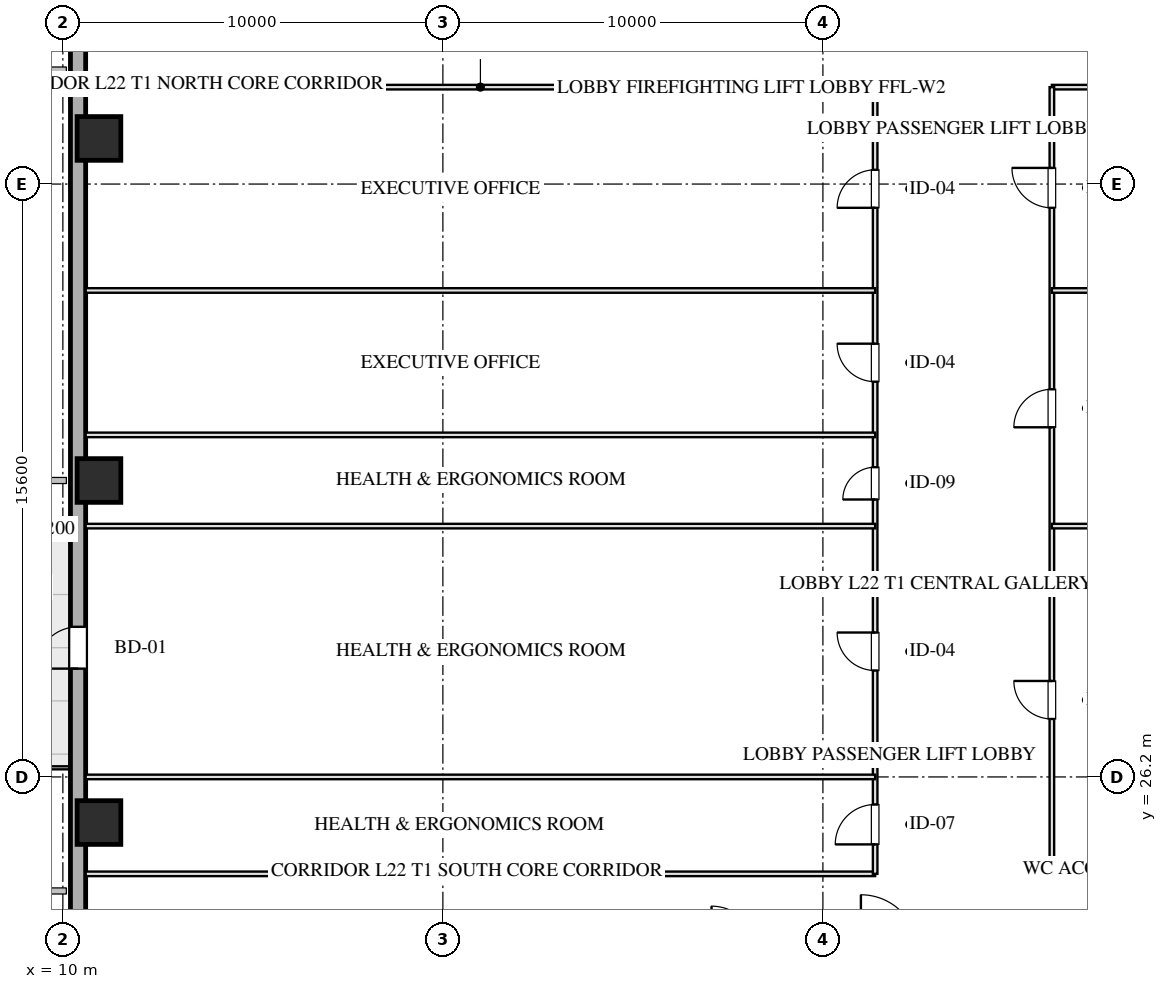
"""IFC4 building model, lengths in metres.
Left out: names, types, materials, properties, quantities, classifications, styles, units other than length and angle.
Written with IfcOpenShell. Run it as: python <this file> out.ifc"""

import sys

from ifc_helpers import new_model, si_unit, direction, frame, frame_2d, origin, origin_2d, place, context, subcontext, project, spatial, rectangle, hollow_rectangle, extrude, element, fill, save


model = new_model("IFC4")
c1 = context("Model", 3, precision=1e-05, world=origin(), true_north=direction((0.0, 1.0)))
c2 = subcontext(c1, "Body", "Model", "MODEL_VIEW")
j1 = project(units=[si_unit("LENGTHUNIT", "METRE"), si_unit("PLANEANGLEUNIT", "RADIAN")], contexts=[c1])
p1 = place(None, origin())
s1 = spatial("IfcSite", under=j1, at=p1, CompositionType="ELEMENT")
p2 = place(p1, origin())
s2 = spatial("IfcBuilding", under=s1, at=p2, CompositionType="ELEMENT")
p3 = place(p2, frame((0.0, 0.0, 88.55)))
s3 = spatial("IfcBuildingStorey", under=s2, at=p3, CompositionType="ELEMENT", Elevation=88.55)
for number, where, z_axis, x_axis in (
    (1, (10.95, 25.0, 0.0), (0.0, 0.0, 1.0), (1.0, 0.0, 0.0)),
    (2, (10.95, 34.0, 0.0), (0.0, 0.0, 1.0), (1.0, 0.0, 0.0)),
    (3, (10.95, 43.0, 0.0), (0.0, 0.0, 1.0), (1.0, 0.0, 0.0)),
):
    element("IfcColumn", number, at=place(p3, frame(where, z_axis=z_axis, x_axis=x_axis)), inside=s3, PredefinedType="COLUMN", context=c2, shape_type="SweptSolid", body=[
        extrude(hollow_rectangle(XDim=1.15, YDim=1.15, WallThickness=0.04, at=origin_2d()), origin(), (0.0, 0.0, 1.0), 3.451),
    ])
p4 = place(p3, frame((10.4, 7.2, 0.0), z_axis=(0.0, 0.0, 1.0), x_axis=(0.0, 1.0, 0.0)))
e4 = element("IfcWall", 4, at=p4, inside=s3, PredefinedType="SOLIDWALL", context=c2, shape_type="SweptSolid", body=[
    extrude(rectangle(XDim=53.6, YDim=0.4, at=frame_2d((26.8, 0.0))), origin(), (0.0, 0.0, 1.0), 2.55),
])
p5 = place(p4, frame((21.85, 0.0, 0.0)))
e5 = element("IfcOpeningElement", 5, at=p5, cuts=e4, PredefinedType="OPENING", context=c2, shape_type="SweptSolid", body=[
    extrude(rectangle(XDim=1.1, YDim=2.15, at=frame_2d((0.55, 1.075))), frame((0.0, 0.21, 0.0), z_axis=(0.0, -1.0, 0.0), x_axis=(1.0, 0.0, 0.0)), (0.0, 0.0, 1.0), 0.42),
])
p6 = place(p3, frame((10.6, 23.65, 0.0), z_axis=(0.0, 0.0, 1.0), x_axis=(1.0, 0.0, 0.0)))
e6 = element("IfcWall", 6, at=p6, inside=s3, PredefinedType="PARTITIONING", context=c2, shape_type="SweptSolid", body=[
    extrude(rectangle(XDim=20.775, YDim=0.12, at=frame_2d((10.387, 0.0))), origin(), (0.0, 0.0, 1.0), 2.15),
])
p7 = place(p3, frame((36.025, 23.65, 0.0), z_axis=(0.0, 0.0, 1.0), x_axis=(1.0, 0.0, 0.0)))
e7 = element("IfcWall", 7, at=p7, inside=s3, PredefinedType="PARTITIONING", context=c2, shape_type="SweptSolid", body=[
    extrude(rectangle(XDim=13.375, YDim=0.12, at=frame_2d((6.688, 0.0))), origin(), (0.0, 0.0, 1.0), 2.15),
])
p8 = place(p3, frame((10.6, 44.35, 0.0), z_axis=(0.0, 0.0, 1.0), x_axis=(1.0, 0.0, 0.0)))
e8 = element("IfcWall", 8, at=p8, inside=s3, PredefinedType="PARTITIONING", context=c2, shape_type="SweptSolid", body=[
    extrude(rectangle(XDim=20.775, YDim=0.12, at=frame_2d((10.387, 0.0))), origin(), (0.0, 0.0, 1.0), 2.15),
])
p9 = place(p3, frame((36.025, 44.35, 0.0), z_axis=(0.0, 0.0, 1.0), x_axis=(1.0, 0.0, 0.0)))
e9 = element("IfcWall", 9, at=p9, inside=s3, PredefinedType="PARTITIONING", context=c2, shape_type="SweptSolid", body=[
    extrude(rectangle(XDim=13.375, YDim=0.12, at=frame_2d((6.688, 0.0))), origin(), (0.0, 0.0, 1.0), 2.15),
])
p10 = place(p3, frame((31.375, 23.65, 0.0), z_axis=(0.0, 0.0, 1.0), x_axis=(0.0, 1.0, 0.0)))
e10 = element("IfcWall", 10, at=p10, inside=s3, PredefinedType="PARTITIONING", context=c2, shape_type="SweptSolid", body=[
    extrude(rectangle(XDim=20.7, YDim=0.12, at=frame_2d((10.35, 0.0))), origin(), (0.0, 0.0, 1.0), 3.155),
])
p11 = place(p10, frame((0.775, 0.0, 0.0)))
e11 = element("IfcOpeningElement", 11, at=p11, cuts=e10, PredefinedType="OPENING", context=c2, shape_type="SweptSolid", body=[
    extrude(rectangle(XDim=1.05, YDim=2.05, at=frame_2d((0.525, 1.025))), frame((0.0, 0.07, 0.0), z_axis=(0.0, -1.0, 0.0), x_axis=(1.0, 0.0, 0.0)), (0.0, 0.0, 1.0), 0.14),
])
p12 = place(p10, frame((5.35, 0.0, 0.0)))
e12 = element("IfcOpeningElement", 12, at=p12, cuts=e10, PredefinedType="OPENING", context=c2, shape_type="SweptSolid", body=[
    extrude(rectangle(XDim=1.0, YDim=2.05, at=frame_2d((0.5, 1.025))), frame((0.0, 0.07, 0.0), z_axis=(0.0, -1.0, 0.0), x_axis=(1.0, 0.0, 0.0)), (0.0, 0.0, 1.0), 0.14),
])
p13 = place(p10, frame((9.85, 0.0, 0.0)))
e13 = element("IfcOpeningElement", 13, at=p13, cuts=e10, PredefinedType="OPENING", context=c2, shape_type="SweptSolid", body=[
    extrude(rectangle(XDim=0.85, YDim=2.05, at=frame_2d((0.425, 1.025))), frame((0.0, 0.07, 0.0), z_axis=(0.0, -1.0, 0.0), x_axis=(1.0, 0.0, 0.0)), (0.0, 0.0, 1.0), 0.14),
])
p14 = place(p10, frame((12.95, 0.0, 0.0)))
e14 = element("IfcOpeningElement", 14, at=p14, cuts=e10, PredefinedType="OPENING", context=c2, shape_type="SweptSolid", body=[
    extrude(rectangle(XDim=1.0, YDim=2.05, at=frame_2d((0.5, 1.025))), frame((0.0, 0.07, 0.0), z_axis=(0.0, -1.0, 0.0), x_axis=(1.0, 0.0, 0.0)), (0.0, 0.0, 1.0), 0.14),
])
p15 = place(p10, frame((17.525, 0.0, 0.0)))
e15 = element("IfcOpeningElement", 15, at=p15, cuts=e10, PredefinedType="OPENING", context=c2, shape_type="SweptSolid", body=[
    extrude(rectangle(XDim=1.0, YDim=2.05, at=frame_2d((0.5, 1.025))), frame((0.0, 0.07, 0.0), z_axis=(0.0, -1.0, 0.0), x_axis=(1.0, 0.0, 0.0)), (0.0, 0.0, 1.0), 0.14),
])
p16 = place(p3, frame((36.025, 23.65, 0.0), z_axis=(0.0, 0.0, 1.0), x_axis=(0.0, 1.0, 0.0)))
e16 = element("IfcWall", 16, at=p16, inside=s3, PredefinedType="PARTITIONING", context=c2, shape_type="SweptSolid", body=[
    extrude(rectangle(XDim=20.7, YDim=0.12, at=frame_2d((10.35, 0.0))), origin(), (0.0, 0.0, 1.0), 3.155),
])
p17 = place(p16, frame((4.075, 0.0, 0.0)))
e17 = element("IfcOpeningElement", 17, at=p17, cuts=e16, PredefinedType="OPENING", context=c2, shape_type="SweptSolid", body=[
    extrude(rectangle(XDim=1.0, YDim=2.05, at=frame_2d((0.5, 1.025))), frame((0.0, 0.07, 0.0), z_axis=(0.0, -1.0, 0.0), x_axis=(1.0, 0.0, 0.0)), (0.0, 0.0, 1.0), 0.14),
])
p18 = place(p16, frame((11.75, 0.0, 0.0)))
e18 = element("IfcOpeningElement", 18, at=p18, cuts=e16, PredefinedType="OPENING", context=c2, shape_type="SweptSolid", body=[
    extrude(rectangle(XDim=1.0, YDim=2.05, at=frame_2d((0.5, 1.025))), frame((0.0, 0.07, 0.0), z_axis=(0.0, -1.0, 0.0), x_axis=(1.0, 0.0, 0.0)), (0.0, 0.0, 1.0), 0.14),
])
p19 = place(p16, frame((17.525, 0.0, 0.0)))
e19 = element("IfcOpeningElement", 19, at=p19, cuts=e16, PredefinedType="OPENING", context=c2, shape_type="SweptSolid", body=[
    extrude(rectangle(XDim=1.05, YDim=2.05, at=frame_2d((0.525, 1.025))), frame((0.0, 0.07, 0.0), z_axis=(0.0, -1.0, 0.0), x_axis=(1.0, 0.0, 0.0)), (0.0, 0.0, 1.0), 0.14),
])
for number, where, z_axis, x_axis in (
    (20, (10.6, 26.2, 0.0), (0.0, 0.0, 1.0), (1.0, 0.0, 0.0)),
    (21, (10.6, 32.8, 0.0), (0.0, 0.0, 1.0), (1.0, 0.0, 0.0)),
    (22, (10.6, 35.2, 0.0), (0.0, 0.0, 1.0), (1.0, 0.0, 0.0)),
    (23, (10.6, 39.0, 0.0), (0.0, 0.0, 1.0), (1.0, 0.0, 0.0)),
):
    element("IfcWall", number, at=place(p3, frame(where, z_axis=z_axis, x_axis=x_axis)), inside=s3, PredefinedType="PARTITIONING", context=c2, shape_type="SweptSolid", body=[
        extrude(rectangle(XDim=20.775, YDim=0.12, at=frame_2d((10.387, 0.0))), origin(), (0.0, 0.0, 1.0), 3.155),
    ])
for number, where, z_axis, x_axis in (
    (24, (36.025, 32.8, 0.0), (0.0, 0.0, 1.0), (1.0, 0.0, 0.0)),
    (25, (36.025, 39.0, 0.0), (0.0, 0.0, 1.0), (1.0, 0.0, 0.0)),
):
    element("IfcWall", number, at=place(p3, frame(where, z_axis=z_axis, x_axis=x_axis)), inside=s3, PredefinedType="PARTITIONING", context=c2, shape_type="SweptSolid", body=[
        extrude(rectangle(XDim=13.375, YDim=0.12, at=frame_2d((6.688, 0.0))), origin(), (0.0, 0.0, 1.0), 3.155),
    ])
p20 = place(p5, origin())
e26 = element("IfcDoor", 26, at=p20, inside=s3, OperationType="SINGLE_SWING_LEFT", PredefinedType="DOOR", context=c2, shape_type="SweptSolid", body=[
    extrude(rectangle(XDim=1.1, YDim=2.15, at=frame_2d((0.55, 1.075))), frame((0.0, 0.025, 0.0), z_axis=(0.0, -1.0, 0.0), x_axis=(1.0, 0.0, 0.0)), (0.0, 0.0, 1.0), 0.05),
])
fill(e5, e26)
p21 = place(p11, origin())
e27 = element("IfcDoor", 27, at=p21, inside=s3, OperationType="SINGLE_SWING_LEFT", PredefinedType="DOOR", context=c2, shape_type="SweptSolid", body=[
    extrude(rectangle(XDim=1.05, YDim=2.05, at=frame_2d((0.525, 1.025))), frame((0.0, 0.025, 0.0), z_axis=(0.0, -1.0, 0.0), x_axis=(1.0, 0.0, 0.0)), (0.0, 0.0, 1.0), 0.05),
])
fill(e11, e27)
p22 = place(p12, origin())
e28 = element("IfcDoor", 28, at=p22, inside=s3, OperationType="SINGLE_SWING_RIGHT", PredefinedType="DOOR", context=c2, shape_type="SweptSolid", body=[
    extrude(rectangle(XDim=1.0, YDim=2.05, at=frame_2d((0.5, 1.025))), frame((0.0, 0.025, 0.0), z_axis=(0.0, -1.0, 0.0), x_axis=(1.0, 0.0, 0.0)), (0.0, 0.0, 1.0), 0.05),
])
fill(e12, e28)
p23 = place(p13, origin())
e29 = element("IfcDoor", 29, at=p23, inside=s3, OperationType="SINGLE_SWING_LEFT", PredefinedType="DOOR", context=c2, shape_type="SweptSolid", body=[
    extrude(rectangle(XDim=0.85, YDim=2.05, at=frame_2d((0.425, 1.025))), frame((0.0, 0.025, 0.0), z_axis=(0.0, -1.0, 0.0), x_axis=(1.0, 0.0, 0.0)), (0.0, 0.0, 1.0), 0.05),
])
fill(e13, e29)
p24 = place(p14, origin())
e30 = element("IfcDoor", 30, at=p24, inside=s3, OperationType="SINGLE_SWING_RIGHT", PredefinedType="DOOR", context=c2, shape_type="SweptSolid", body=[
    extrude(rectangle(XDim=1.0, YDim=2.05, at=frame_2d((0.5, 1.025))), frame((0.0, 0.025, 0.0), z_axis=(0.0, -1.0, 0.0), x_axis=(1.0, 0.0, 0.0)), (0.0, 0.0, 1.0), 0.05),
])
fill(e14, e30)
p25 = place(p15, origin())
e31 = element("IfcDoor", 31, at=p25, inside=s3, OperationType="SINGLE_SWING_LEFT", PredefinedType="DOOR", context=c2, shape_type="SweptSolid", body=[
    extrude(rectangle(XDim=1.0, YDim=2.05, at=frame_2d((0.5, 1.025))), frame((0.0, 0.025, 0.0), z_axis=(0.0, -1.0, 0.0), x_axis=(1.0, 0.0, 0.0)), (0.0, 0.0, 1.0), 0.05),
])
fill(e15, e31)
p26 = place(p17, origin())
e32 = element("IfcDoor", 32, at=p26, inside=s3, OperationType="SINGLE_SWING_RIGHT", PredefinedType="DOOR", context=c2, shape_type="SweptSolid", body=[
    extrude(rectangle(XDim=1.0, YDim=2.05, at=frame_2d((0.5, 1.025))), frame((0.0, 0.025, 0.0), z_axis=(0.0, -1.0, 0.0), x_axis=(1.0, 0.0, 0.0)), (0.0, 0.0, 1.0), 0.05),
])
fill(e17, e32)
p27 = place(p18, origin())
e33 = element("IfcDoor", 33, at=p27, inside=s3, OperationType="SINGLE_SWING_LEFT", PredefinedType="DOOR", context=c2, shape_type="SweptSolid", body=[
    extrude(rectangle(XDim=1.0, YDim=2.05, at=frame_2d((0.5, 1.025))), frame((0.0, 0.025, 0.0), z_axis=(0.0, -1.0, 0.0), x_axis=(1.0, 0.0, 0.0)), (0.0, 0.0, 1.0), 0.05),
])
fill(e18, e33)
p28 = place(p19, origin())
e34 = element("IfcDoor", 34, at=p28, inside=s3, OperationType="SINGLE_SWING_RIGHT", PredefinedType="DOOR", context=c2, shape_type="SweptSolid", body=[
    extrude(rectangle(XDim=1.05, YDim=2.05, at=frame_2d((0.525, 1.025))), frame((0.0, 0.025, 0.0), z_axis=(0.0, -1.0, 0.0), x_axis=(1.0, 0.0, 0.0)), (0.0, 0.0, 1.0), 0.05),
])
fill(e19, e34)
save(model, sys.argv[1])
